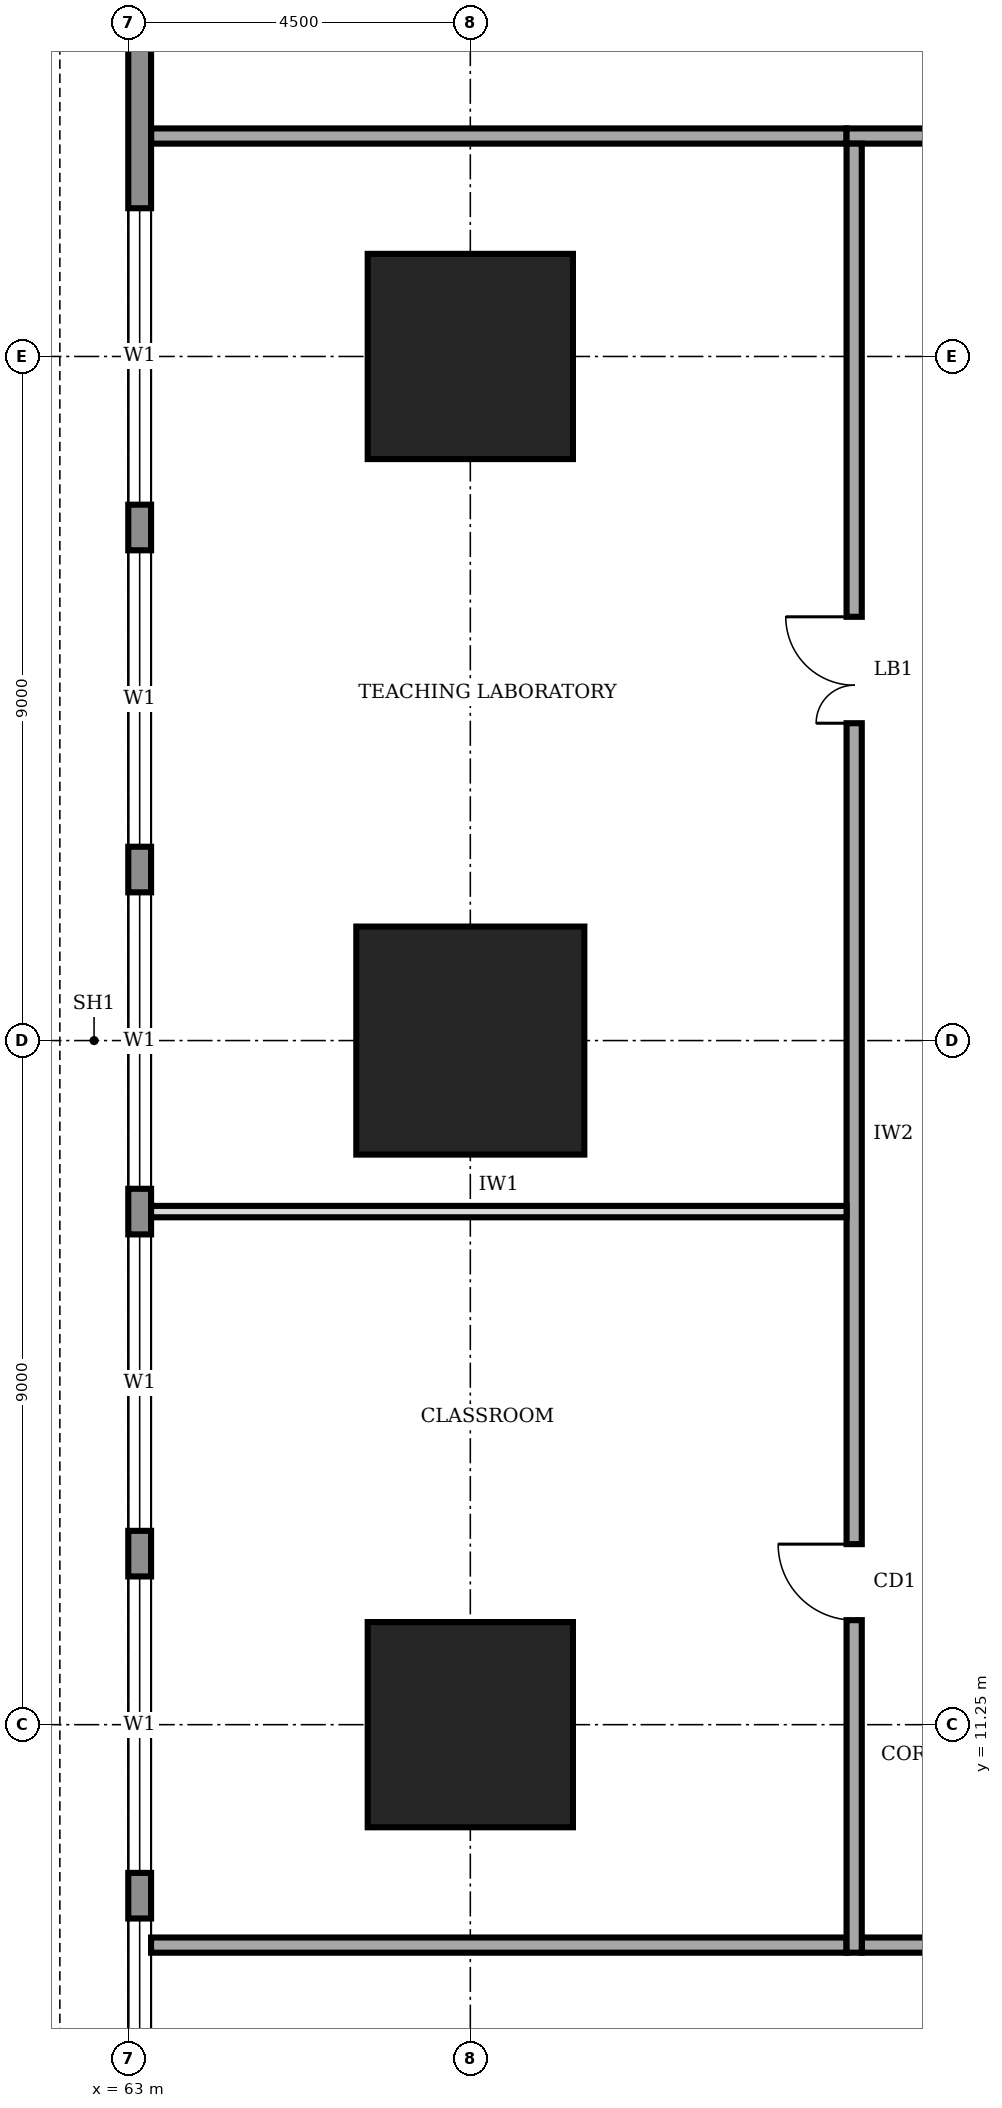
"""IFC4 building model, lengths in metres.
Left out: names, types, materials, properties, quantities, classifications, styles, units other than length and angle.
Written with IfcOpenShell. Run it as: python <this file> out.ifc"""

import sys

from ifc_helpers import new_model, si_unit, direction, frame, frame_2d, origin, origin_2d, place, context, subcontext, project, spatial, rectangle, extrude, element, fill, save


model = new_model("IFC4")
c1 = context("Model", 3, precision=1e-05, world=origin(), true_north=direction((0.0, 1.0)))
c2 = subcontext(c1, "Body", "Model", "MODEL_VIEW")
j1 = project(units=[si_unit("LENGTHUNIT", "METRE"), si_unit("PLANEANGLEUNIT", "RADIAN")], contexts=[c1])
p1 = place(None, origin())
s1 = spatial("IfcSite", under=j1, at=p1, CompositionType="ELEMENT")
p2 = place(p1, origin())
s2 = spatial("IfcBuilding", under=s1, at=p2, CompositionType="ELEMENT")
p3 = place(p2, frame((0.0, 0.0, 41.0)))
s3 = spatial("IfcBuildingStorey", under=s2, at=p3, CompositionType="ELEMENT", Elevation=41.0)
p4 = place(p3, frame((67.5, 11.25, 0.0), z_axis=(0.0, 0.0, 1.0), x_axis=(1.0, 0.0, 0.0)))
e1 = element("IfcColumn", 1, at=p4, inside=s3, PredefinedType="COLUMN", context=c2, shape_type="SweptSolid", body=[
    extrude(rectangle(XDim=2.7, YDim=2.7, at=origin_2d()), origin(), (0.0, 0.0, 1.0), 4.0),
])
p5 = place(p3, frame((67.5, 20.25, 0.0), z_axis=(0.0, 0.0, 1.0), x_axis=(1.0, 0.0, 0.0)))
e2 = element("IfcColumn", 2, at=p5, inside=s3, PredefinedType="COLUMN", context=c2, shape_type="SweptSolid", body=[
    extrude(rectangle(XDim=3.0, YDim=3.0, at=origin_2d()), origin(), (0.0, 0.0, 1.0), 4.0),
])
p6 = place(p3, frame((67.5, 29.25, 0.0), z_axis=(0.0, 0.0, 1.0), x_axis=(1.0, 0.0, 0.0)))
e3 = element("IfcColumn", 3, at=p6, inside=s3, PredefinedType="COLUMN", context=c2, shape_type="SweptSolid", body=[
    extrude(rectangle(XDim=2.7, YDim=2.7, at=origin_2d()), origin(), (0.0, 0.0, 1.0), 4.0),
])
p7 = place(p3, frame((63.15, 35.98, 0.0), z_axis=(0.0, 0.0, 1.0), x_axis=(0.0, -1.0, 0.0)))
e4 = element("IfcWall", 4, at=p7, inside=s3, PredefinedType="STANDARD", context=c2, shape_type="SweptSolid", body=[
    extrude(rectangle(XDim=31.46, YDim=0.3, at=frame_2d((15.73, 0.0))), origin(), (0.0, 0.0, 1.0), 3.75),
])
p8 = place(p7, frame((27.28, 0.0, 0.9)))
e5 = element("IfcOpeningElement", 5, at=p8, cuts=e4, PredefinedType="OPENING", context=c2, shape_type="SweptSolid", body=[
    extrude(rectangle(XDim=3.9, YDim=2.2, at=frame_2d((1.95, 1.1))), frame((0.0, 0.16, 0.0), z_axis=(0.0, -1.0, 0.0), x_axis=(1.0, 0.0, 0.0)), (0.0, 0.0, 1.0), 0.32),
])
p9 = place(p7, frame((22.78, 0.0, 0.9)))
e6 = element("IfcOpeningElement", 6, at=p9, cuts=e4, PredefinedType="OPENING", context=c2, shape_type="SweptSolid", body=[
    extrude(rectangle(XDim=3.9, YDim=2.2, at=frame_2d((1.95, 1.1))), frame((0.0, 0.16, 0.0), z_axis=(0.0, -1.0, 0.0), x_axis=(1.0, 0.0, 0.0)), (0.0, 0.0, 1.0), 0.32),
])
p10 = place(p7, frame((18.28, 0.0, 0.9)))
e7 = element("IfcOpeningElement", 7, at=p10, cuts=e4, PredefinedType="OPENING", context=c2, shape_type="SweptSolid", body=[
    extrude(rectangle(XDim=3.9, YDim=2.2, at=frame_2d((1.95, 1.1))), frame((0.0, 0.16, 0.0), z_axis=(0.0, -1.0, 0.0), x_axis=(1.0, 0.0, 0.0)), (0.0, 0.0, 1.0), 0.32),
])
p11 = place(p7, frame((13.78, 0.0, 0.9)))
e8 = element("IfcOpeningElement", 8, at=p11, cuts=e4, PredefinedType="OPENING", context=c2, shape_type="SweptSolid", body=[
    extrude(rectangle(XDim=3.9, YDim=2.2, at=frame_2d((1.95, 1.1))), frame((0.0, 0.16, 0.0), z_axis=(0.0, -1.0, 0.0), x_axis=(1.0, 0.0, 0.0)), (0.0, 0.0, 1.0), 0.32),
])
p12 = place(p7, frame((9.28, 0.0, 0.9)))
e9 = element("IfcOpeningElement", 9, at=p12, cuts=e4, PredefinedType="OPENING", context=c2, shape_type="SweptSolid", body=[
    extrude(rectangle(XDim=3.9, YDim=2.2, at=frame_2d((1.95, 1.1))), frame((0.0, 0.16, 0.0), z_axis=(0.0, -1.0, 0.0), x_axis=(1.0, 0.0, 0.0)), (0.0, 0.0, 1.0), 0.32),
])
p13 = place(p7, frame((4.78, 0.0, 0.9)))
e10 = element("IfcOpeningElement", 10, at=p13, cuts=e4, PredefinedType="OPENING", context=c2, shape_type="SweptSolid", body=[
    extrude(rectangle(XDim=3.9, YDim=2.2, at=frame_2d((1.95, 1.1))), frame((0.0, 0.16, 0.0), z_axis=(0.0, -1.0, 0.0), x_axis=(1.0, 0.0, 0.0)), (0.0, 0.0, 1.0), 0.32),
])
p14 = place(p3, frame((72.65, 8.35, 0.0), z_axis=(0.0, 0.0, 1.0), x_axis=(1.0, 0.0, 0.0)))
e11 = element("IfcWall", 11, at=p14, inside=s3, PredefinedType="SOLIDWALL", context=c2, shape_type="SweptSolid", body=[
    extrude(rectangle(XDim=16.9, YDim=0.2, at=frame_2d((8.45, 0.0))), origin(), (0.0, 0.0, 1.0), 3.75),
])
p15 = place(p14, frame((1.325, 0.0, 0.0)))
e12 = element("IfcOpeningElement", 12, at=p15, cuts=e11, PredefinedType="OPENING", context=c2, shape_type="SweptSolid", body=[
    extrude(rectangle(XDim=1.0, YDim=2.1, at=frame_2d((0.5, 1.05))), frame((0.0, 0.11, 0.0), z_axis=(0.0, -1.0, 0.0), x_axis=(1.0, 0.0, 0.0)), (0.0, 0.0, 1.0), 0.22),
])
p16 = place(p14, frame((5.6, 0.0, 0.0)))
e13 = element("IfcOpeningElement", 13, at=p16, cuts=e11, PredefinedType="OPENING", context=c2, shape_type="SweptSolid", body=[
    extrude(rectangle(XDim=1.0, YDim=2.1, at=frame_2d((0.5, 1.05))), frame((0.0, 0.11, 0.0), z_axis=(0.0, -1.0, 0.0), x_axis=(1.0, 0.0, 0.0)), (0.0, 0.0, 1.0), 0.22),
])
p17 = place(p14, frame((11.925, 0.0, 0.0)))
e14 = element("IfcOpeningElement", 14, at=p17, cuts=e11, PredefinedType="OPENING", context=c2, shape_type="SweptSolid", body=[
    extrude(rectangle(XDim=1.4, YDim=2.1, at=frame_2d((0.7, 1.05))), frame((0.0, 0.11, 0.0), z_axis=(0.0, -1.0, 0.0), x_axis=(1.0, 0.0, 0.0)), (0.0, 0.0, 1.0), 0.22),
])
p18 = place(p3, frame((89.35, 32.15, 0.0), z_axis=(0.0, 0.0, 1.0), x_axis=(-1.0, 0.0, 0.0)))
e15 = element("IfcWall", 15, at=p18, inside=s3, PredefinedType="SOLIDWALL", context=c2, shape_type="SweptSolid", body=[
    extrude(rectangle(XDim=16.9, YDim=0.2, at=frame_2d((8.45, 0.0))), origin(), (0.0, 0.0, 1.0), 3.75),
])
p19 = place(p18, frame((14.375, 0.0, 0.0)))
e16 = element("IfcOpeningElement", 16, at=p19, cuts=e15, PredefinedType="OPENING", context=c2, shape_type="SweptSolid", body=[
    extrude(rectangle(XDim=1.0, YDim=2.1, at=frame_2d((0.5, 1.05))), frame((0.0, 0.11, 0.0), z_axis=(0.0, -1.0, 0.0), x_axis=(1.0, 0.0, 0.0)), (0.0, 0.0, 1.0), 0.22),
])
p20 = place(p18, frame((7.85, 0.0, 0.0)))
e17 = element("IfcOpeningElement", 17, at=p20, cuts=e15, PredefinedType="OPENING", context=c2, shape_type="SweptSolid", body=[
    extrude(rectangle(XDim=1.0, YDim=2.1, at=frame_2d((0.5, 1.05))), frame((0.0, 0.11, 0.0), z_axis=(0.0, -1.0, 0.0), x_axis=(1.0, 0.0, 0.0)), (0.0, 0.0, 1.0), 0.22),
])
p21 = place(p18, frame((1.325, 0.0, 0.0)))
e18 = element("IfcOpeningElement", 18, at=p21, cuts=e15, PredefinedType="OPENING", context=c2, shape_type="SweptSolid", body=[
    extrude(rectangle(XDim=1.0, YDim=2.1, at=frame_2d((0.5, 1.05))), frame((0.0, 0.11, 0.0), z_axis=(0.0, -1.0, 0.0), x_axis=(1.0, 0.0, 0.0)), (0.0, 0.0, 1.0), 0.22),
])
p22 = place(p3, frame((72.55, 32.05, 0.0), z_axis=(0.0, 0.0, 1.0), x_axis=(0.0, -1.0, 0.0)))
e19 = element("IfcWall", 19, at=p22, inside=s3, PredefinedType="SOLIDWALL", context=c2, shape_type="SweptSolid", body=[
    extrude(rectangle(XDim=23.8, YDim=0.2, at=frame_2d((11.9, 0.0))), origin(), (0.0, 0.0, 1.0), 3.75),
])
p23 = place(p22, frame((18.425, 0.0, 0.0)))
e20 = element("IfcOpeningElement", 20, at=p23, cuts=e19, PredefinedType="OPENING", context=c2, shape_type="SweptSolid", body=[
    extrude(rectangle(XDim=1.0, YDim=2.1, at=frame_2d((0.5, 1.05))), frame((0.0, 0.11, 0.0), z_axis=(0.0, -1.0, 0.0), x_axis=(1.0, 0.0, 0.0)), (0.0, 0.0, 1.0), 0.22),
])
p24 = place(p22, frame((6.225, 0.0, 0.0)))
e21 = element("IfcOpeningElement", 21, at=p24, cuts=e19, PredefinedType="OPENING", context=c2, shape_type="SweptSolid", body=[
    extrude(rectangle(XDim=1.4, YDim=2.1, at=frame_2d((0.7, 1.05))), frame((0.0, 0.11, 0.0), z_axis=(0.0, -1.0, 0.0), x_axis=(1.0, 0.0, 0.0)), (0.0, 0.0, 1.0), 0.22),
])
for number, where, z_axis, x_axis in (
    (22, (63.3, 8.35, 0.0), (0.0, 0.0, 1.0), (1.0, 0.0, 0.0)),
    (23, (63.3, 32.15, 0.0), (0.0, 0.0, 1.0), (1.0, 0.0, 0.0)),
):
    element("IfcWall", number, at=place(p3, frame(where, z_axis=z_axis, x_axis=x_axis)), inside=s3, PredefinedType="SOLIDWALL", context=c2, shape_type="SweptSolid", body=[
        extrude(rectangle(XDim=9.15, YDim=0.2, at=frame_2d((4.575, 0.0))), origin(), (0.0, 0.0, 1.0), 3.75),
    ])
p25 = place(p3, frame((63.3, 18.0, 0.0), z_axis=(0.0, 0.0, 1.0), x_axis=(1.0, 0.0, 0.0)))
e24 = element("IfcWall", 24, at=p25, inside=s3, PredefinedType="PARTITIONING", context=c2, shape_type="SweptSolid", body=[
    extrude(rectangle(XDim=9.15, YDim=0.15, at=frame_2d((4.575, 0.0))), origin(), (0.0, 0.0, 1.0), 3.75),
])
p26 = place(p8, origin())
e25 = element("IfcWindow", 25, at=p26, inside=s3, PartitioningType="SINGLE_PANEL", PredefinedType="WINDOW", context=c2, shape_type="SweptSolid", body=[
    extrude(rectangle(XDim=3.9, YDim=2.2, at=frame_2d((1.95, 1.1))), frame((0.0, 0.03, 0.0), z_axis=(0.0, -1.0, 0.0), x_axis=(1.0, 0.0, 0.0)), (0.0, 0.0, 1.0), 0.06),
])
fill(e5, e25)
p27 = place(p9, origin())
e26 = element("IfcWindow", 26, at=p27, inside=s3, PartitioningType="SINGLE_PANEL", PredefinedType="WINDOW", context=c2, shape_type="SweptSolid", body=[
    extrude(rectangle(XDim=3.9, YDim=2.2, at=frame_2d((1.95, 1.1))), frame((0.0, 0.03, 0.0), z_axis=(0.0, -1.0, 0.0), x_axis=(1.0, 0.0, 0.0)), (0.0, 0.0, 1.0), 0.06),
])
fill(e6, e26)
p28 = place(p10, origin())
e27 = element("IfcWindow", 27, at=p28, inside=s3, PartitioningType="SINGLE_PANEL", PredefinedType="WINDOW", context=c2, shape_type="SweptSolid", body=[
    extrude(rectangle(XDim=3.9, YDim=2.2, at=frame_2d((1.95, 1.1))), frame((0.0, 0.03, 0.0), z_axis=(0.0, -1.0, 0.0), x_axis=(1.0, 0.0, 0.0)), (0.0, 0.0, 1.0), 0.06),
])
fill(e7, e27)
p29 = place(p11, origin())
e28 = element("IfcWindow", 28, at=p29, inside=s3, PartitioningType="SINGLE_PANEL", PredefinedType="WINDOW", context=c2, shape_type="SweptSolid", body=[
    extrude(rectangle(XDim=3.9, YDim=2.2, at=frame_2d((1.95, 1.1))), frame((0.0, 0.03, 0.0), z_axis=(0.0, -1.0, 0.0), x_axis=(1.0, 0.0, 0.0)), (0.0, 0.0, 1.0), 0.06),
])
fill(e8, e28)
p30 = place(p12, origin())
e29 = element("IfcWindow", 29, at=p30, inside=s3, PartitioningType="SINGLE_PANEL", PredefinedType="WINDOW", context=c2, shape_type="SweptSolid", body=[
    extrude(rectangle(XDim=3.9, YDim=2.2, at=frame_2d((1.95, 1.1))), frame((0.0, 0.03, 0.0), z_axis=(0.0, -1.0, 0.0), x_axis=(1.0, 0.0, 0.0)), (0.0, 0.0, 1.0), 0.06),
])
fill(e9, e29)
p31 = place(p13, origin())
e30 = element("IfcWindow", 30, at=p31, inside=s3, PartitioningType="SINGLE_PANEL", PredefinedType="WINDOW", context=c2, shape_type="SweptSolid", body=[
    extrude(rectangle(XDim=3.9, YDim=2.2, at=frame_2d((1.95, 1.1))), frame((0.0, 0.03, 0.0), z_axis=(0.0, -1.0, 0.0), x_axis=(1.0, 0.0, 0.0)), (0.0, 0.0, 1.0), 0.06),
])
fill(e10, e30)
p32 = place(p23, frame((1.0, 0.0, 0.0), z_axis=(0.0, 0.0, 1.0), x_axis=(-1.0, 0.0, 0.0)))
e31 = element("IfcDoor", 31, at=p32, inside=s3, OperationType="SINGLE_SWING_RIGHT", PredefinedType="DOOR", context=c2, shape_type="SweptSolid", body=[
    extrude(rectangle(XDim=1.0, YDim=2.1, at=frame_2d((0.5, 1.05))), frame((0.0, 0.025, 0.0), z_axis=(0.0, -1.0, 0.0), x_axis=(1.0, 0.0, 0.0)), (0.0, 0.0, 1.0), 0.05),
])
fill(e20, e31)
p33 = place(p24, frame((1.4, 0.0, 0.0), z_axis=(0.0, 0.0, 1.0), x_axis=(-1.0, 0.0, 0.0)))
e32 = element("IfcDoor", 32, at=p33, inside=s3, OperationType="DOUBLE_DOOR_SINGLE_SWING", PredefinedType="DOOR", context=c2, shape_type="SweptSolid", body=[
    extrude(rectangle(XDim=1.4, YDim=2.1, at=frame_2d((0.7, 1.05))), frame((0.0, 0.025, 0.0), z_axis=(0.0, -1.0, 0.0), x_axis=(1.0, 0.0, 0.0)), (0.0, 0.0, 1.0), 0.05),
])
fill(e21, e32)
save(model, sys.argv[1])
